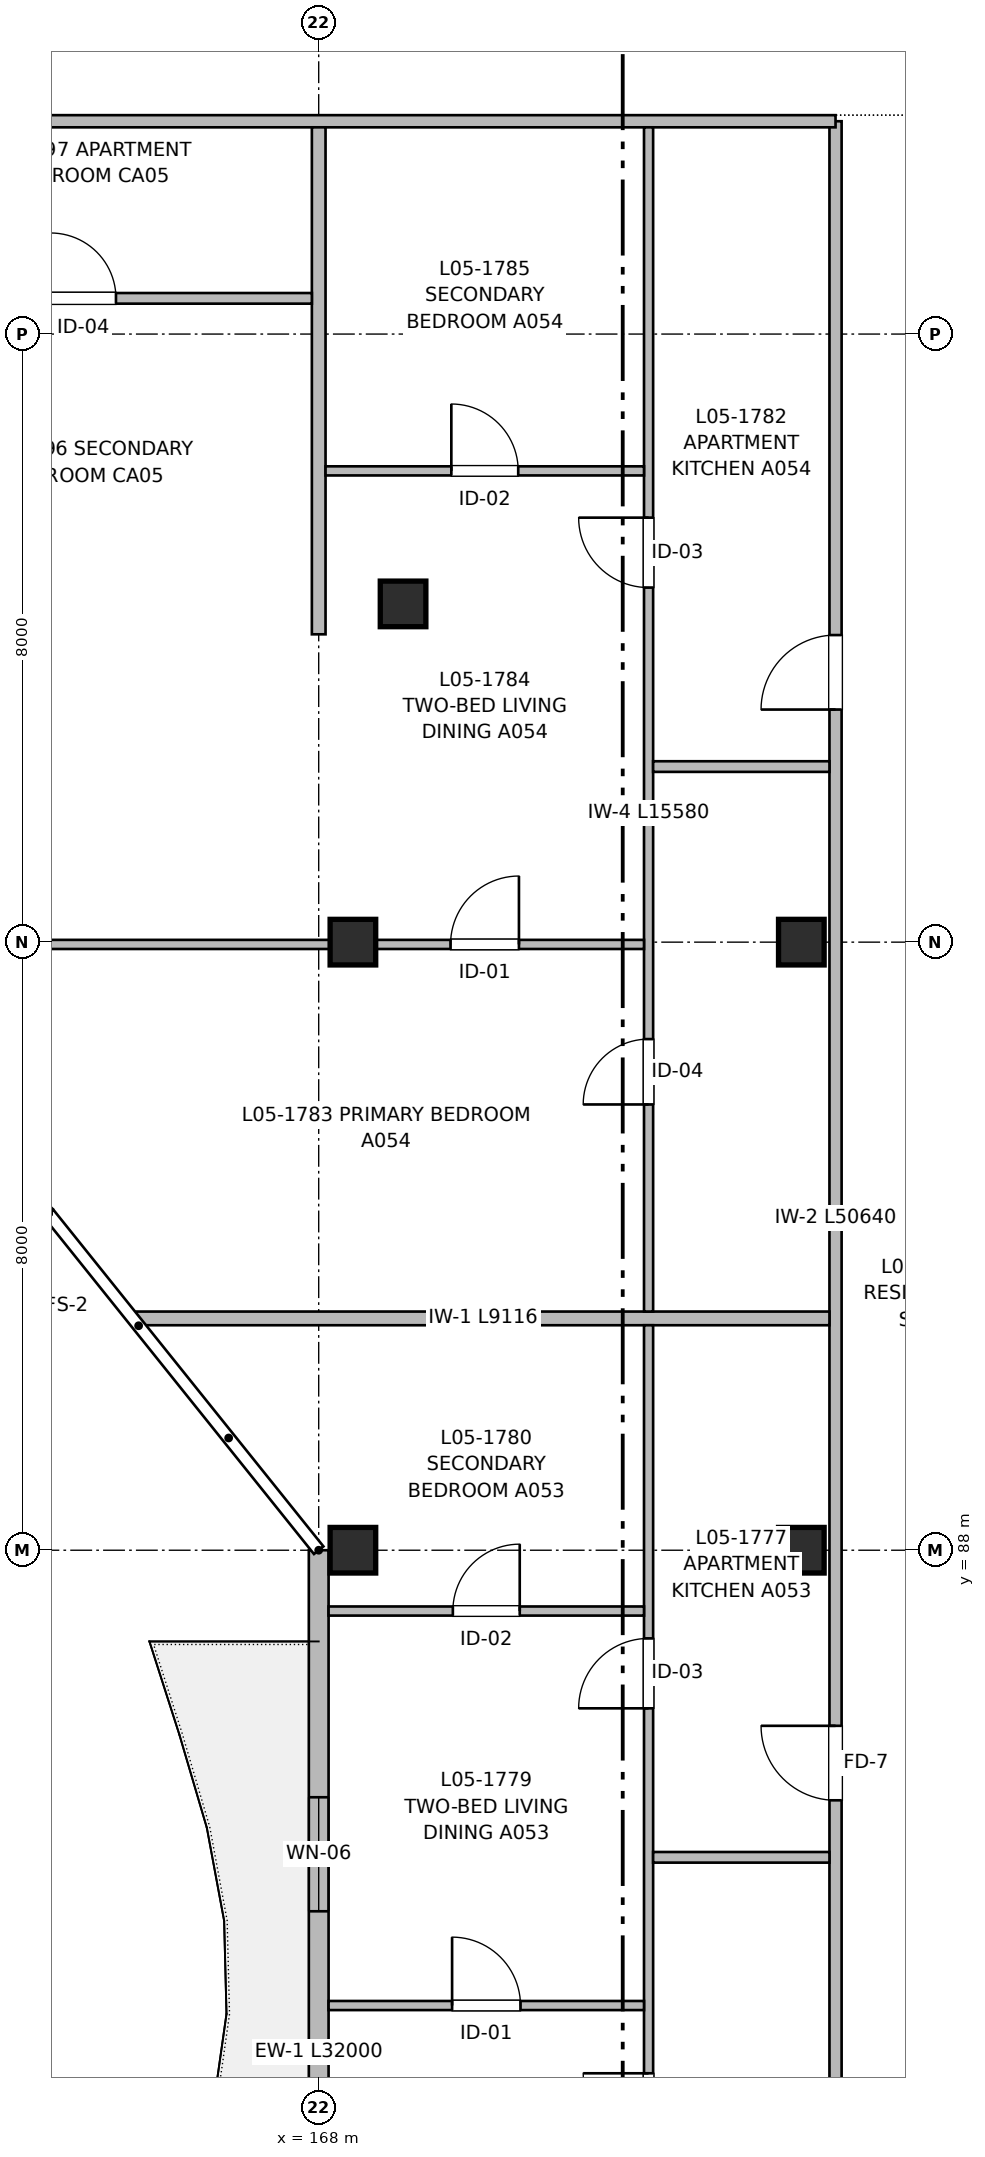
"""IFC4 building model, lengths in metres.
Left out: names, types, materials, properties, quantities, classifications, styles, units other than length and angle.
Written with IfcOpenShell. Run it as: python <this file> out.ifc"""

import sys

from ifc_helpers import new_model, si_unit, direction, frame, frame_2d, origin, origin_2d, place, context, subcontext, project, spatial, rectangle, extrude, element, fill, save


model = new_model("IFC4")
c1 = context("Model", 3, precision=1e-05, world=origin(), true_north=direction((0.0, 1.0)))
c2 = subcontext(c1, "Body", "Model", "MODEL_VIEW")
j1 = project(units=[si_unit("LENGTHUNIT", "METRE"), si_unit("PLANEANGLEUNIT", "RADIAN")], contexts=[c1])
p1 = place(None, origin())
s1 = spatial("IfcSite", under=j1, at=p1, CompositionType="ELEMENT")
p2 = place(p1, origin())
s2 = spatial("IfcBuilding", under=s1, at=p2, CompositionType="ELEMENT")
p3 = place(p2, frame((0.0, 0.0, 16.96)))
s3 = spatial("IfcBuildingStorey", under=s2, at=p3, CompositionType="ELEMENT", Elevation=16.96)
for number, where, z_axis, x_axis in (
    (1, (168.45, 88.0, 0.0), (0.0, 0.0, 1.0), (1.0, 0.0, 0.0)),
    (2, (168.45, 96.0, 0.0), (0.0, 0.0, 1.0), (1.0, 0.0, 0.0)),
    (3, (169.11, 100.45, 0.0), (0.0, 0.0, 1.0), (1.0, 0.0, 0.0)),
    (4, (174.35, 88.0, 0.0), (0.0, 0.0, 1.0), (1.0, 0.0, 0.0)),
    (5, (174.35, 96.0, 0.0), (0.0, 0.0, 1.0), (1.0, 0.0, 0.0)),
):
    element("IfcColumn", number, at=place(p3, frame(where, z_axis=z_axis, x_axis=x_axis)), inside=s3, PredefinedType="COLUMN", context=c2, shape_type="SweptSolid", body=[
        extrude(rectangle(XDim=0.6, YDim=0.6, at=origin_2d()), origin(), (0.0, 0.0, 1.0), 3.2),
    ])
p4 = place(p3, frame((168.0, 56.0, 0.0), z_axis=(0.0, 0.0, 1.0), x_axis=(0.0, 1.0, 0.0)))
e6 = element("IfcWall", 6, at=p4, inside=s3, PredefinedType="SOLIDWALL", context=c2, shape_type="SweptSolid", body=[
    extrude(rectangle(XDim=32.0, YDim=0.26, at=frame_2d((16.0, 0.0))), origin(), (0.0, 0.0, 1.0), 2.98),
])
p5 = place(p4, frame((3.4, 0.0, 0.0)))
e7 = element("IfcOpeningElement", 7, at=p5, cuts=e6, PredefinedType="OPENING", context=c2, shape_type="SweptSolid", body=[
    extrude(rectangle(XDim=1.2, YDim=2.2, at=frame_2d((0.6, 1.1))), frame((0.0, 0.14, 0.0), z_axis=(0.0, -1.0, 0.0), x_axis=(1.0, 0.0, 0.0)), (0.0, 0.0, 1.0), 0.28),
])
p6 = place(p4, frame((9.1, 0.0, 0.9)))
e8 = element("IfcOpeningElement", 8, at=p6, cuts=e6, PredefinedType="OPENING", context=c2, shape_type="SweptSolid", body=[
    extrude(rectangle(XDim=1.2, YDim=1.05, at=frame_2d((0.6, 0.525))), frame((0.0, 0.14, 0.0), z_axis=(0.0, -1.0, 0.0), x_axis=(1.0, 0.0, 0.0)), (0.0, 0.0, 1.0), 0.28),
])
p7 = place(p4, frame((11.2, 0.0, 0.77)))
e9 = element("IfcOpeningElement", 9, at=p7, cuts=e6, PredefinedType="OPENING", context=c2, shape_type="SweptSolid", body=[
    extrude(rectangle(XDim=1.6, YDim=1.45, at=frame_2d((0.8, 0.725))), frame((0.0, 0.14, 0.0), z_axis=(0.0, -1.0, 0.0), x_axis=(1.0, 0.0, 0.0)), (0.0, 0.0, 1.0), 0.28),
])
p8 = place(p4, frame((18.8, 0.0, 0.72)))
e10 = element("IfcOpeningElement", 10, at=p8, cuts=e6, PredefinedType="OPENING", context=c2, shape_type="SweptSolid", body=[
    extrude(rectangle(XDim=2.4, YDim=1.5, at=frame_2d((1.2, 0.75))), frame((0.0, 0.14, 0.0), z_axis=(0.0, -1.0, 0.0), x_axis=(1.0, 0.0, 0.0)), (0.0, 0.0, 1.0), 0.28),
])
p9 = place(p4, frame((27.25, 0.0, 0.82)))
e11 = element("IfcOpeningElement", 11, at=p9, cuts=e6, PredefinedType="OPENING", context=c2, shape_type="SweptSolid", body=[
    extrude(rectangle(XDim=1.5, YDim=1.4, at=frame_2d((0.75, 0.7))), frame((0.0, 0.14, 0.0), z_axis=(0.0, -1.0, 0.0), x_axis=(1.0, 0.0, 0.0)), (0.0, 0.0, 1.0), 0.28),
])
p10 = place(p4, frame((22.16, 0.0, 0.87)))
e12 = element("IfcOpeningElement", 12, at=p10, cuts=e6, PredefinedType="OPENING", context=c2, shape_type="SweptSolid", body=[
    extrude(rectangle(XDim=1.4, YDim=1.35, at=frame_2d((0.7, 0.675))), frame((0.0, 0.14, 0.0), z_axis=(0.0, -1.0, 0.0), x_axis=(1.0, 0.0, 0.0)), (0.0, 0.0, 1.0), 0.28),
])
p11 = place(p3, frame((174.8, 56.16, 0.0), z_axis=(0.0, 0.0, 1.0), x_axis=(0.0, 1.0, 0.0)))
e13 = element("IfcWall", 13, at=p11, inside=s3, PredefinedType="PARTITIONING", context=c2, shape_type="SweptSolid", body=[
    extrude(rectangle(XDim=50.64, YDim=0.16, at=frame_2d((25.32, 0.0))), origin(), (0.0, 0.0, 1.0), 2.935),
])
p12 = place(p11, frame((5.59, 0.0, 0.0)))
e14 = element("IfcOpeningElement", 14, at=p12, cuts=e13, PredefinedType="OPENING", context=c2, shape_type="SweptSolid", body=[
    extrude(rectangle(XDim=0.98, YDim=2.15, at=frame_2d((0.49, 1.075))), frame((0.0, 0.09, 0.0), z_axis=(0.0, -1.0, 0.0), x_axis=(1.0, 0.0, 0.0)), (0.0, 0.0, 1.0), 0.18),
])
p13 = place(p11, frame((16.49, 0.0, 0.0)))
e15 = element("IfcOpeningElement", 15, at=p13, cuts=e13, PredefinedType="OPENING", context=c2, shape_type="SweptSolid", body=[
    extrude(rectangle(XDim=1.02, YDim=2.15, at=frame_2d((0.51, 1.075))), frame((0.0, 0.09, 0.0), z_axis=(0.0, -1.0, 0.0), x_axis=(1.0, 0.0, 0.0)), (0.0, 0.0, 1.0), 0.18),
])
p14 = place(p11, frame((28.55, 0.0, 0.0)))
e16 = element("IfcOpeningElement", 16, at=p14, cuts=e13, PredefinedType="OPENING", context=c2, shape_type="SweptSolid", body=[
    extrude(rectangle(XDim=0.98, YDim=2.15, at=frame_2d((0.49, 1.075))), frame((0.0, 0.09, 0.0), z_axis=(0.0, -1.0, 0.0), x_axis=(1.0, 0.0, 0.0)), (0.0, 0.0, 1.0), 0.18),
])
p15 = place(p11, frame((42.9, 0.0, 0.0)))
e17 = element("IfcOpeningElement", 17, at=p15, cuts=e13, PredefinedType="OPENING", context=c2, shape_type="SweptSolid", body=[
    extrude(rectangle(XDim=0.98, YDim=2.15, at=frame_2d((0.49, 1.075))), frame((0.0, 0.09, 0.0), z_axis=(0.0, -1.0, 0.0), x_axis=(1.0, 0.0, 0.0)), (0.0, 0.0, 1.0), 0.18),
])
p16 = place(p3, frame((147.16, 106.8, 0.0), z_axis=(0.0, 0.0, 1.0), x_axis=(1.0, 0.0, 0.0)))
e18 = element("IfcWall", 18, at=p16, inside=s3, PredefinedType="PARTITIONING", context=c2, shape_type="SweptSolid", body=[
    extrude(rectangle(XDim=27.64, YDim=0.16, at=frame_2d((13.82, 0.0))), origin(), (0.0, 0.0, 1.0), 2.935),
])
p17 = place(p16, frame((3.515, 0.0, 0.0)))
e19 = element("IfcOpeningElement", 19, at=p17, cuts=e18, PredefinedType="OPENING", context=c2, shape_type="SweptSolid", body=[
    extrude(rectangle(XDim=1.05, YDim=2.15, at=frame_2d((0.525, 1.075))), frame((0.0, 0.09, 0.0), z_axis=(0.0, -1.0, 0.0), x_axis=(1.0, 0.0, 0.0)), (0.0, 0.0, 1.0), 0.18),
])
p18 = place(p16, frame((10.69, 0.0, 0.0)))
e20 = element("IfcOpeningElement", 20, at=p18, cuts=e18, PredefinedType="OPENING", context=c2, shape_type="SweptSolid", body=[
    extrude(rectangle(XDim=0.98, YDim=2.15, at=frame_2d((0.49, 1.075))), frame((0.0, 0.09, 0.0), z_axis=(0.0, -1.0, 0.0), x_axis=(1.0, 0.0, 0.0)), (0.0, 0.0, 1.0), 0.18),
])
p19 = place(p3, frame((168.0, 100.05, 0.0), z_axis=(0.0, 0.0, 1.0), x_axis=(0.0, 1.0, 0.0)))
e21 = element("IfcWall", 21, at=p19, inside=s3, PredefinedType="PARTITIONING", context=c2, shape_type="SweptSolid", body=[
    extrude(rectangle(XDim=6.67, YDim=0.18, at=frame_2d((3.335, 0.0))), origin(), (0.0, 0.0, 1.0), 2.935),
])
p20 = place(p3, frame((165.604, 91.05, 0.0), z_axis=(0.0, 0.0, 1.0), x_axis=(1.0, 0.0, 0.0)))
e22 = element("IfcWall", 22, at=p20, inside=s3, PredefinedType="PARTITIONING", context=c2, shape_type="SweptSolid", body=[
    extrude(rectangle(XDim=9.115, YDim=0.18, at=frame_2d((4.558, 0.0))), origin(), (0.0, 0.0, 1.0), 2.935),
])
p21 = place(p3, frame((172.34, 77.99, 0.0), z_axis=(0.0, 0.0, 1.0), x_axis=(0.0, 1.0, 0.0)))
e23 = element("IfcWall", 23, at=p21, inside=s3, PredefinedType="PARTITIONING", context=c2, shape_type="SweptSolid", body=[
    extrude(rectangle(XDim=12.97, YDim=0.12, at=frame_2d((6.485, 0.0))), origin(), (0.0, 0.0, 1.0), 2.935),
])
p22 = place(p21, frame((2.269, 0.0, 0.0)))
e24 = element("IfcOpeningElement", 24, at=p22, cuts=e23, PredefinedType="OPENING", context=c2, shape_type="SweptSolid", body=[
    extrude(rectangle(XDim=0.86, YDim=2.1, at=frame_2d((0.43, 1.05))), frame((0.0, 0.07, 0.0), z_axis=(0.0, -1.0, 0.0), x_axis=(1.0, 0.0, 0.0)), (0.0, 0.0, 1.0), 0.14),
])
p23 = place(p21, frame((7.93, 0.0, 0.0)))
e25 = element("IfcOpeningElement", 25, at=p23, cuts=e23, PredefinedType="OPENING", context=c2, shape_type="SweptSolid", body=[
    extrude(rectangle(XDim=0.92, YDim=2.1, at=frame_2d((0.46, 1.05))), frame((0.0, 0.07, 0.0), z_axis=(0.0, -1.0, 0.0), x_axis=(1.0, 0.0, 0.0)), (0.0, 0.0, 1.0), 0.14),
])
p24 = place(p3, frame((172.4, 83.96, 0.0), z_axis=(0.0, 0.0, 1.0), x_axis=(1.0, 0.0, 0.0)))
e26 = element("IfcWall", 26, at=p24, inside=s3, PredefinedType="PARTITIONING", context=c2, shape_type="SweptSolid", body=[
    extrude(rectangle(XDim=2.32, YDim=0.14, at=frame_2d((1.16, 0.0))), origin(), (0.0, 0.0, 1.0), 2.935),
])
p25 = place(p3, frame((168.13, 82.01, 0.0), z_axis=(0.0, 0.0, 1.0), x_axis=(1.0, 0.0, 0.0)))
e27 = element("IfcWall", 27, at=p25, inside=s3, PredefinedType="PARTITIONING", context=c2, shape_type="SweptSolid", body=[
    extrude(rectangle(XDim=4.15, YDim=0.12, at=frame_2d((2.075, 0.0))), origin(), (0.0, 0.0, 1.0), 2.935),
])
p26 = place(p25, frame((1.625, 0.0, 0.0)))
e28 = element("IfcOpeningElement", 28, at=p26, cuts=e27, PredefinedType="OPENING", context=c2, shape_type="SweptSolid", body=[
    extrude(rectangle(XDim=0.9, YDim=2.1, at=frame_2d((0.45, 1.05))), frame((0.0, 0.07, 0.0), z_axis=(0.0, -1.0, 0.0), x_axis=(1.0, 0.0, 0.0)), (0.0, 0.0, 1.0), 0.14),
])
p27 = place(p3, frame((168.13, 87.2, 0.0), z_axis=(0.0, 0.0, 1.0), x_axis=(1.0, 0.0, 0.0)))
e29 = element("IfcWall", 29, at=p27, inside=s3, PredefinedType="PARTITIONING", context=c2, shape_type="SweptSolid", body=[
    extrude(rectangle(XDim=4.15, YDim=0.12, at=frame_2d((2.075, 0.0))), origin(), (0.0, 0.0, 1.0), 2.935),
])
p28 = place(p27, frame((1.635, 0.0, 0.0)))
e30 = element("IfcOpeningElement", 30, at=p28, cuts=e29, PredefinedType="OPENING", context=c2, shape_type="SweptSolid", body=[
    extrude(rectangle(XDim=0.88, YDim=2.1, at=frame_2d((0.44, 1.05))), frame((0.0, 0.07, 0.0), z_axis=(0.0, -1.0, 0.0), x_axis=(1.0, 0.0, 0.0)), (0.0, 0.0, 1.0), 0.14),
])
p29 = place(p3, frame((172.34, 91.14, 0.0), z_axis=(0.0, 0.0, 1.0), x_axis=(0.0, 1.0, 0.0)))
e31 = element("IfcWall", 31, at=p29, inside=s3, PredefinedType="PARTITIONING", context=c2, shape_type="SweptSolid", body=[
    extrude(rectangle(XDim=15.58, YDim=0.12, at=frame_2d((7.79, 0.0))), origin(), (0.0, 0.0, 1.0), 2.935),
])
p30 = place(p29, frame((2.725, 0.0, 0.0)))
e32 = element("IfcOpeningElement", 32, at=p30, cuts=e31, PredefinedType="OPENING", context=c2, shape_type="SweptSolid", body=[
    extrude(rectangle(XDim=0.86, YDim=2.1, at=frame_2d((0.43, 1.05))), frame((0.0, 0.07, 0.0), z_axis=(0.0, -1.0, 0.0), x_axis=(1.0, 0.0, 0.0)), (0.0, 0.0, 1.0), 0.14),
])
p31 = place(p29, frame((9.525, 0.0, 0.0)))
e33 = element("IfcOpeningElement", 33, at=p31, cuts=e31, PredefinedType="OPENING", context=c2, shape_type="SweptSolid", body=[
    extrude(rectangle(XDim=0.92, YDim=2.1, at=frame_2d((0.46, 1.05))), frame((0.0, 0.07, 0.0), z_axis=(0.0, -1.0, 0.0), x_axis=(1.0, 0.0, 0.0)), (0.0, 0.0, 1.0), 0.14),
])
p32 = place(p3, frame((172.4, 98.31, 0.0), z_axis=(0.0, 0.0, 1.0), x_axis=(1.0, 0.0, 0.0)))
e34 = element("IfcWall", 34, at=p32, inside=s3, PredefinedType="PARTITIONING", context=c2, shape_type="SweptSolid", body=[
    extrude(rectangle(XDim=2.32, YDim=0.14, at=frame_2d((1.16, 0.0))), origin(), (0.0, 0.0, 1.0), 2.935),
])
p33 = place(p3, frame((160.963, 95.97, 0.0), z_axis=(0.0, 0.0, 1.0), x_axis=(1.0, 0.0, 0.0)))
e35 = element("IfcWall", 35, at=p33, inside=s3, PredefinedType="PARTITIONING", context=c2, shape_type="SweptSolid", body=[
    extrude(rectangle(XDim=11.317, YDim=0.12, at=frame_2d((5.659, 0.0))), origin(), (0.0, 0.0, 1.0), 2.53),
])
p34 = place(p33, frame((8.772, 0.0, 0.0)))
e36 = element("IfcOpeningElement", 36, at=p34, cuts=e35, PredefinedType="OPENING", context=c2, shape_type="SweptSolid", body=[
    extrude(rectangle(XDim=0.9, YDim=2.1, at=frame_2d((0.45, 1.05))), frame((0.0, 0.07, 0.0), z_axis=(0.0, -1.0, 0.0), x_axis=(1.0, 0.0, 0.0)), (0.0, 0.0, 1.0), 0.14),
])
p35 = place(p3, frame((168.09, 102.2, 0.0), z_axis=(0.0, 0.0, 1.0), x_axis=(1.0, 0.0, 0.0)))
e37 = element("IfcWall", 37, at=p35, inside=s3, PredefinedType="PARTITIONING", context=c2, shape_type="SweptSolid", body=[
    extrude(rectangle(XDim=4.19, YDim=0.12, at=frame_2d((2.095, 0.0))), origin(), (0.0, 0.0, 1.0), 2.935),
])
p36 = place(p35, frame((1.655, 0.0, 0.0)))
e38 = element("IfcOpeningElement", 38, at=p36, cuts=e37, PredefinedType="OPENING", context=c2, shape_type="SweptSolid", body=[
    extrude(rectangle(XDim=0.88, YDim=2.1, at=frame_2d((0.44, 1.05))), frame((0.0, 0.07, 0.0), z_axis=(0.0, -1.0, 0.0), x_axis=(1.0, 0.0, 0.0)), (0.0, 0.0, 1.0), 0.14),
])
p37 = place(p3, frame((161.94, 104.47, 0.0), z_axis=(0.0, 0.0, 1.0), x_axis=(1.0, 0.0, 0.0)))
e39 = element("IfcWall", 39, at=p37, inside=s3, PredefinedType="PARTITIONING", context=c2, shape_type="SweptSolid", body=[
    extrude(rectangle(XDim=5.97, YDim=0.14, at=frame_2d((2.985, 0.0))), origin(), (0.0, 0.0, 1.0), 2.935),
])
p38 = place(p37, frame((2.533, 0.0, 0.0)))
e40 = element("IfcOpeningElement", 40, at=p38, cuts=e39, PredefinedType="OPENING", context=c2, shape_type="SweptSolid", body=[
    extrude(rectangle(XDim=0.86, YDim=2.1, at=frame_2d((0.43, 1.05))), frame((0.0, 0.08, 0.0), z_axis=(0.0, -1.0, 0.0), x_axis=(1.0, 0.0, 0.0)), (0.0, 0.0, 1.0), 0.16),
])
p39 = place(p9, origin())
e41 = element("IfcWindow", 41, at=p39, inside=s3, PartitioningType="SINGLE_PANEL", PredefinedType="WINDOW", context=c2, shape_type="SweptSolid", body=[
    extrude(rectangle(XDim=1.5, YDim=1.4, at=frame_2d((0.75, 0.7))), frame((0.0, 0.03, 0.0), z_axis=(0.0, -1.0, 0.0), x_axis=(1.0, 0.0, 0.0)), (0.0, 0.0, 1.0), 0.06),
])
fill(e11, e41)
p40 = place(p22, origin())
e42 = element("IfcDoor", 42, at=p40, inside=s3, OperationType="SINGLE_SWING_RIGHT", PredefinedType="DOOR", context=c2, shape_type="SweptSolid", body=[
    extrude(rectangle(XDim=0.86, YDim=2.1, at=frame_2d((0.43, 1.05))), frame((0.0, 0.025, 0.0), z_axis=(0.0, -1.0, 0.0), x_axis=(1.0, 0.0, 0.0)), (0.0, 0.0, 1.0), 0.05),
])
fill(e24, e42)
p41 = place(p23, origin())
e43 = element("IfcDoor", 43, at=p41, inside=s3, OperationType="SINGLE_SWING_LEFT", PredefinedType="DOOR", context=c2, shape_type="SweptSolid", body=[
    extrude(rectangle(XDim=0.92, YDim=2.1, at=frame_2d((0.46, 1.05))), frame((0.0, 0.025, 0.0), z_axis=(0.0, -1.0, 0.0), x_axis=(1.0, 0.0, 0.0)), (0.0, 0.0, 1.0), 0.05),
])
fill(e25, e43)
p42 = place(p14, origin())
e44 = element("IfcDoor", 44, at=p42, inside=s3, OperationType="SINGLE_SWING_RIGHT", PredefinedType="DOOR", context=c2, shape_type="SweptSolid", body=[
    extrude(rectangle(XDim=0.98, YDim=2.15, at=frame_2d((0.49, 1.075))), frame((0.0, 0.025, 0.0), z_axis=(0.0, -1.0, 0.0), x_axis=(1.0, 0.0, 0.0)), (0.0, 0.0, 1.0), 0.05),
])
fill(e16, e44)
p43 = place(p26, origin())
e45 = element("IfcDoor", 45, at=p43, inside=s3, OperationType="SINGLE_SWING_LEFT", PredefinedType="DOOR", context=c2, shape_type="SweptSolid", body=[
    extrude(rectangle(XDim=0.9, YDim=2.1, at=frame_2d((0.45, 1.05))), frame((0.0, 0.025, 0.0), z_axis=(0.0, -1.0, 0.0), x_axis=(1.0, 0.0, 0.0)), (0.0, 0.0, 1.0), 0.05),
])
fill(e28, e45)
p44 = place(p28, origin())
e46 = element("IfcDoor", 46, at=p44, inside=s3, OperationType="SINGLE_SWING_RIGHT", PredefinedType="DOOR", context=c2, shape_type="SweptSolid", body=[
    extrude(rectangle(XDim=0.88, YDim=2.1, at=frame_2d((0.44, 1.05))), frame((0.0, 0.025, 0.0), z_axis=(0.0, -1.0, 0.0), x_axis=(1.0, 0.0, 0.0)), (0.0, 0.0, 1.0), 0.05),
])
fill(e30, e46)
p45 = place(p30, origin())
e47 = element("IfcDoor", 47, at=p45, inside=s3, OperationType="SINGLE_SWING_LEFT", PredefinedType="DOOR", context=c2, shape_type="SweptSolid", body=[
    extrude(rectangle(XDim=0.86, YDim=2.1, at=frame_2d((0.43, 1.05))), frame((0.0, 0.025, 0.0), z_axis=(0.0, -1.0, 0.0), x_axis=(1.0, 0.0, 0.0)), (0.0, 0.0, 1.0), 0.05),
])
fill(e32, e47)
p46 = place(p31, origin())
e48 = element("IfcDoor", 48, at=p46, inside=s3, OperationType="SINGLE_SWING_RIGHT", PredefinedType="DOOR", context=c2, shape_type="SweptSolid", body=[
    extrude(rectangle(XDim=0.92, YDim=2.1, at=frame_2d((0.46, 1.05))), frame((0.0, 0.025, 0.0), z_axis=(0.0, -1.0, 0.0), x_axis=(1.0, 0.0, 0.0)), (0.0, 0.0, 1.0), 0.05),
])
fill(e33, e48)
p47 = place(p15, origin())
e49 = element("IfcDoor", 49, at=p47, inside=s3, OperationType="SINGLE_SWING_LEFT", PredefinedType="DOOR", context=c2, shape_type="SweptSolid", body=[
    extrude(rectangle(XDim=0.98, YDim=2.15, at=frame_2d((0.49, 1.075))), frame((0.0, 0.025, 0.0), z_axis=(0.0, -1.0, 0.0), x_axis=(1.0, 0.0, 0.0)), (0.0, 0.0, 1.0), 0.05),
])
fill(e17, e49)
p48 = place(p34, origin())
e50 = element("IfcDoor", 50, at=p48, inside=s3, OperationType="SINGLE_SWING_RIGHT", PredefinedType="DOOR", context=c2, shape_type="SweptSolid", body=[
    extrude(rectangle(XDim=0.9, YDim=2.1, at=frame_2d((0.45, 1.05))), frame((0.0, 0.025, 0.0), z_axis=(0.0, -1.0, 0.0), x_axis=(1.0, 0.0, 0.0)), (0.0, 0.0, 1.0), 0.05),
])
fill(e36, e50)
p49 = place(p36, origin())
e51 = element("IfcDoor", 51, at=p49, inside=s3, OperationType="SINGLE_SWING_LEFT", PredefinedType="DOOR", context=c2, shape_type="SweptSolid", body=[
    extrude(rectangle(XDim=0.88, YDim=2.1, at=frame_2d((0.44, 1.05))), frame((0.0, 0.025, 0.0), z_axis=(0.0, -1.0, 0.0), x_axis=(1.0, 0.0, 0.0)), (0.0, 0.0, 1.0), 0.05),
])
fill(e38, e51)
p50 = place(p38, origin())
e52 = element("IfcDoor", 52, at=p50, inside=s3, OperationType="SINGLE_SWING_LEFT", PredefinedType="DOOR", context=c2, shape_type="SweptSolid", body=[
    extrude(rectangle(XDim=0.86, YDim=2.1, at=frame_2d((0.43, 1.05))), frame((0.0, 0.025, 0.0), z_axis=(0.0, -1.0, 0.0), x_axis=(1.0, 0.0, 0.0)), (0.0, 0.0, 1.0), 0.05),
])
fill(e40, e52)
save(model, sys.argv[1])
